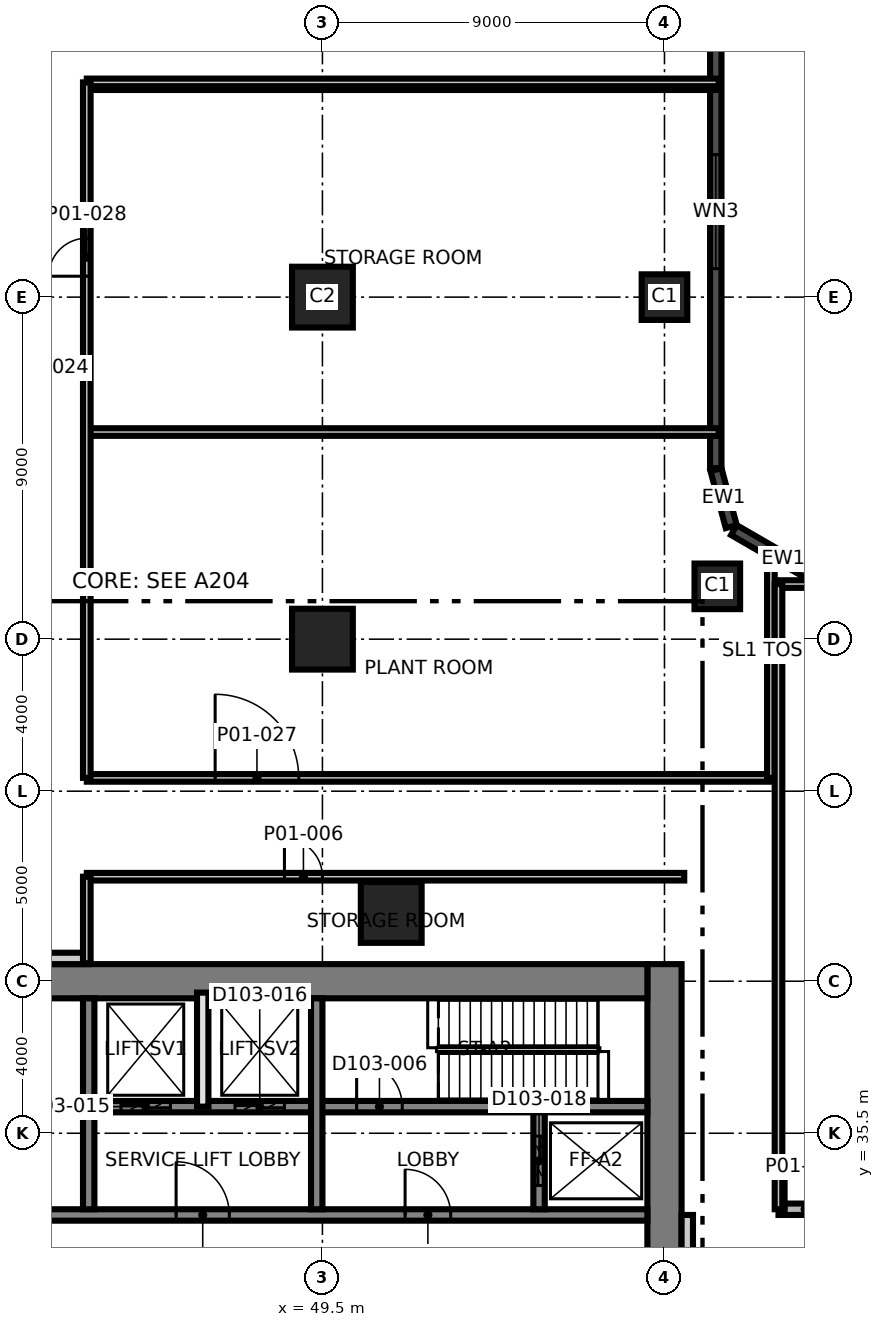
"""IFC4 building model, lengths in metres.
Left out: names, types, materials, properties, quantities, classifications, styles, units other than length and angle.
Written with IfcOpenShell. Run it as: python <this file> out.ifc"""

import sys

from ifc_helpers import new_model, si_unit, direction, frame, frame_2d, origin, origin_2d, place, context, subcontext, project, spatial, rectangle, extrude, element, fill, save


model = new_model("IFC4")
c1 = context("Model", 3, precision=1e-05, world=origin(), true_north=direction((0.0, 1.0)))
c2 = subcontext(c1, "Body", "Model", "MODEL_VIEW")
j1 = project(units=[si_unit("LENGTHUNIT", "METRE"), si_unit("PLANEANGLEUNIT", "RADIAN")], contexts=[c1])
p1 = place(None, origin())
s1 = spatial("IfcSite", under=j1, at=p1, CompositionType="ELEMENT")
p2 = place(p1, origin())
s2 = spatial("IfcBuilding", under=s1, at=p2, CompositionType="ELEMENT")
p3 = place(p2, frame((0.0, 0.0, 8.0)))
s3 = spatial("IfcBuildingStorey", under=s2, at=p3, CompositionType="ELEMENT", Elevation=8.0)
p4 = place(p3, frame((58.5, 21.05, 0.0), z_axis=(0.0, 0.0, 1.0), x_axis=(0.0, 1.0, 0.0)))
e1 = element("IfcWall", 1, at=p4, inside=s3, PredefinedType="SHEAR", context=c2, shape_type="SweptSolid", body=[
    extrude(rectangle(XDim=18.9, YDim=0.9, at=frame_2d((9.45, 0.0))), origin(), (0.0, 0.0, 1.0), 5.5),
])
p5 = place(p3, frame((31.05, 39.5, 0.0), z_axis=(0.0, 0.0, 1.0), x_axis=(1.0, 0.0, 0.0)))
e2 = element("IfcWall", 2, at=p5, inside=s3, PredefinedType="SHEAR", context=c2, shape_type="SweptSolid", body=[
    extrude(rectangle(XDim=27.0, YDim=0.9, at=frame_2d((13.5, 0.0))), origin(), (0.0, 0.0, 1.0), 5.5),
])
p6 = place(p3, frame((31.95, 33.35, 0.0), z_axis=(0.0, 0.0, 1.0), x_axis=(1.0, 0.0, 0.0)))
e3 = element("IfcWall", 3, at=p6, inside=s3, PredefinedType="SHEAR", context=c2, shape_type="SweptSolid", body=[
    extrude(rectangle(XDim=26.1, YDim=0.3, at=frame_2d((13.05, 0.0))), origin(), (0.0, 0.0, 1.0), 5.5),
])
p7 = place(p6, frame((13.7, 0.0, 0.0)))
e4 = element("IfcOpeningElement", 4, at=p7, cuts=e3, PredefinedType="OPENING", context=c2, shape_type="SweptSolid", body=[
    extrude(rectangle(XDim=1.4, YDim=2.1, at=frame_2d((0.7, 1.05))), frame((0.0, 0.16, 0.0), z_axis=(0.0, -1.0, 0.0), x_axis=(1.0, 0.0, 0.0)), (0.0, 0.0, 1.0), 0.32),
])
p8 = place(p6, frame((5.175, 0.0, 0.0)))
e5 = element("IfcOpeningElement", 5, at=p8, cuts=e3, PredefinedType="OPENING", context=c2, shape_type="SweptSolid", body=[
    extrude(rectangle(XDim=1.2, YDim=2.1, at=frame_2d((0.6, 1.05))), frame((0.0, 0.16, 0.0), z_axis=(0.0, -1.0, 0.0), x_axis=(1.0, 0.0, 0.0)), (0.0, 0.0, 1.0), 0.32),
])
p9 = place(p6, frame((19.725, 0.0, 0.0)))
e6 = element("IfcOpeningElement", 6, at=p9, cuts=e3, PredefinedType="OPENING", context=c2, shape_type="SweptSolid", body=[
    extrude(rectangle(XDim=1.2, YDim=2.1, at=frame_2d((0.6, 1.05))), frame((0.0, 0.16, 0.0), z_axis=(0.0, -1.0, 0.0), x_axis=(1.0, 0.0, 0.0)), (0.0, 0.0, 1.0), 0.32),
])
p10 = place(p3, frame((43.5, 36.2, 0.0), z_axis=(0.0, 0.0, 1.0), x_axis=(1.0, 0.0, 0.0)))
e7 = element("IfcWall", 7, at=p10, inside=s3, PredefinedType="SHEAR", context=c2, shape_type="SweptSolid", body=[
    extrude(rectangle(XDim=14.55, YDim=0.3, at=frame_2d((7.275, 0.0))), origin(), (0.0, 0.0, 1.0), 5.5),
])
p11 = place(p10, frame((6.9, 0.0, 0.0)))
e8 = element("IfcOpeningElement", 8, at=p11, cuts=e7, PredefinedType="OPENING", context=c2, shape_type="SweptSolid", body=[
    extrude(rectangle(XDim=1.2, YDim=2.1, at=frame_2d((0.6, 1.05))), frame((0.0, 0.16, 0.0), z_axis=(0.0, -1.0, 0.0), x_axis=(1.0, 0.0, 0.0)), (0.0, 0.0, 1.0), 0.32),
])
p12 = place(p10, frame((0.7, 0.0, 0.0)))
e9 = element("IfcOpeningElement", 9, at=p12, cuts=e7, PredefinedType="OPENING", context=c2, shape_type="SweptSolid", body=[
    extrude(rectangle(XDim=1.3, YDim=2.4, at=frame_2d((0.65, 1.2))), frame((0.0, 0.16, 0.0), z_axis=(0.0, -1.0, 0.0), x_axis=(1.0, 0.0, 0.0)), (0.0, 0.0, 1.0), 0.32),
])
p13 = place(p10, frame((3.7, 0.0, 0.0)))
e10 = element("IfcOpeningElement", 10, at=p13, cuts=e7, PredefinedType="OPENING", context=c2, shape_type="SweptSolid", body=[
    extrude(rectangle(XDim=1.3, YDim=2.4, at=frame_2d((0.65, 1.2))), frame((0.0, 0.16, 0.0), z_axis=(0.0, -1.0, 0.0), x_axis=(1.0, 0.0, 0.0)), (0.0, 0.0, 1.0), 0.32),
])
for number, where, z_axis, x_axis in (
    (11, (43.35, 33.5, 0.0), (0.0, 0.0, 1.0), (0.0, 1.0, 0.0)),
    (12, (49.35, 33.5, 0.0), (0.0, 0.0, 1.0), (0.0, 1.0, 0.0)),
):
    element("IfcWall", number, at=place(p3, frame(where, z_axis=z_axis, x_axis=x_axis)), inside=s3, PredefinedType="SHEAR", context=c2, shape_type="SweptSolid", body=[
        extrude(rectangle(XDim=5.55, YDim=0.3, at=frame_2d((2.775, 0.0))), origin(), (0.0, 0.0, 1.0), 5.5),
    ])
p14 = place(p3, frame((55.2, 33.5, 0.0), z_axis=(0.0, 0.0, 1.0), x_axis=(0.0, 1.0, 0.0)))
e13 = element("IfcWall", 13, at=p14, inside=s3, PredefinedType="SHEAR", context=c2, shape_type="SweptSolid", body=[
    extrude(rectangle(XDim=2.55, YDim=0.3, at=frame_2d((1.275, 0.0))), origin(), (0.0, 0.0, 1.0), 5.5),
])
p15 = place(p14, frame((0.625, 0.0, 0.0)))
e14 = element("IfcOpeningElement", 14, at=p15, cuts=e13, PredefinedType="OPENING", context=c2, shape_type="SweptSolid", body=[
    extrude(rectangle(XDim=1.3, YDim=2.4, at=frame_2d((0.65, 1.2))), frame((0.0, 0.16, 0.0), z_axis=(0.0, -1.0, 0.0), x_axis=(1.0, 0.0, 0.0)), (0.0, 0.0, 1.0), 0.32),
])
p16 = place(p3, frame((49.5, 48.5, 0.0), z_axis=(0.0, 0.0, 1.0), x_axis=(1.0, 0.0, 0.0)))
e15 = element("IfcColumn", 15, at=p16, inside=s3, PredefinedType="COLUMN", context=c2, shape_type="SweptSolid", body=[
    extrude(rectangle(XDim=1.6, YDim=1.6, at=origin_2d()), origin(), (0.0, 0.0, 1.0), 5.5),
])
p17 = place(p3, frame((59.89, 49.89, 0.0), z_axis=(0.0, 0.0, 1.0), x_axis=(1.0, 0.0, 0.0)))
e16 = element("IfcColumn", 16, at=p17, inside=s3, PredefinedType="COLUMN", context=c2, shape_type="SweptSolid", body=[
    extrude(rectangle(XDim=1.2, YDim=1.2, at=origin_2d()), origin(), (0.0, 0.0, 1.0), 5.5),
])
p18 = place(p3, frame((49.5, 57.5, 0.0), z_axis=(0.0, 0.0, 1.0), x_axis=(1.0, 0.0, 0.0)))
e17 = element("IfcColumn", 17, at=p18, inside=s3, PredefinedType="COLUMN", context=c2, shape_type="SweptSolid", body=[
    extrude(rectangle(XDim=1.6, YDim=1.6, at=origin_2d()), origin(), (0.0, 0.0, 1.0), 5.5),
])
p19 = place(p3, frame((58.5, 57.5, 0.0), z_axis=(0.0, 0.0, 1.0), x_axis=(1.0, 0.0, 0.0)))
e18 = element("IfcColumn", 18, at=p19, inside=s3, PredefinedType="COLUMN", context=c2, shape_type="SweptSolid", body=[
    extrude(rectangle(XDim=1.2, YDim=1.2, at=origin_2d()), origin(), (0.0, 0.0, 1.0), 5.5),
])
p20 = place(p3, frame((51.31, 41.31, 0.0), z_axis=(0.0, 0.0, 1.0), x_axis=(1.0, 0.0, 0.0)))
e19 = element("IfcColumn", 19, at=p20, inside=s3, PredefinedType="COLUMN", context=c2, shape_type="SweptSolid", body=[
    extrude(rectangle(XDim=1.6, YDim=1.6, at=origin_2d()), origin(), (0.0, 0.0, 1.0), 5.5),
])
p21 = place(p3, frame((62.925, 49.87, 0.0), z_axis=(0.0, 0.0, 1.0), x_axis=(-0.866031096941, 0.499990139034, 0.0)))
e20 = element("IfcWall", 20, at=p21, inside=s3, PredefinedType="SOLIDWALL", context=c2, shape_type="SweptSolid", body=[
    extrude(rectangle(XDim=3.0, YDim=0.3, at=frame_2d((1.5, 0.0))), origin(), (0.0, 0.0, 1.0), 5.2),
])
p22 = place(p3, frame((60.257, 51.461, 0.0), z_axis=(0.0, 0.0, 1.0), x_axis=(-0.258777996848, 0.965936824201, 0.0)))
e21 = element("IfcWall", 21, at=p22, inside=s3, PredefinedType="SOLIDWALL", context=c2, shape_type="SweptSolid", body=[
    extrude(rectangle(XDim=1.553, YDim=0.3, at=frame_2d((0.776, 0.0))), origin(), (0.0, 0.0, 1.0), 5.2),
])
p23 = place(p3, frame((59.85, 53.0, 0.0), z_axis=(0.0, 0.0, 1.0), x_axis=(0.0, 1.0, 0.0)))
e22 = element("IfcWall", 22, at=p23, inside=s3, PredefinedType="SOLIDWALL", context=c2, shape_type="SweptSolid", body=[
    extrude(rectangle(XDim=26.928, YDim=0.3, at=frame_2d((13.464, 0.0))), origin(), (0.0, 0.0, 1.0), 5.2),
])
p24 = place(p23, frame((5.25, 0.0, 0.9)))
e23 = element("IfcOpeningElement", 23, at=p24, cuts=e22, PredefinedType="OPENING", context=c2, shape_type="SweptSolid", body=[
    extrude(rectangle(XDim=3.0, YDim=2.4, at=frame_2d((1.5, 1.2))), frame((0.0, 0.16, 0.0), z_axis=(0.0, -1.0, 0.0), x_axis=(1.0, 0.0, 0.0)), (0.0, 0.0, 1.0), 0.32),
])
p25 = place(p23, frame((14.25, 0.0, 0.9)))
e24 = element("IfcOpeningElement", 24, at=p25, cuts=e22, PredefinedType="OPENING", context=c2, shape_type="SweptSolid", body=[
    extrude(rectangle(XDim=3.0, YDim=2.4, at=frame_2d((1.5, 1.2))), frame((0.0, 0.16, 0.0), z_axis=(0.0, -1.0, 0.0), x_axis=(1.0, 0.0, 0.0)), (0.0, 0.0, 1.0), 0.32),
])
p26 = place(p23, frame((18.75, 0.0, 0.9)))
e25 = element("IfcOpeningElement", 25, at=p26, cuts=e22, PredefinedType="OPENING", context=c2, shape_type="SweptSolid", body=[
    extrude(rectangle(XDim=3.0, YDim=2.4, at=frame_2d((1.5, 1.2))), frame((0.0, 0.16, 0.0), z_axis=(0.0, -1.0, 0.0), x_axis=(1.0, 0.0, 0.0)), (0.0, 0.0, 1.0), 0.32),
])
p27 = place(p23, frame((23.25, 0.0, 0.9)))
e26 = element("IfcOpeningElement", 26, at=p27, cuts=e22, PredefinedType="OPENING", context=c2, shape_type="SweptSolid", body=[
    extrude(rectangle(XDim=3.0, YDim=2.4, at=frame_2d((1.5, 1.2))), frame((0.0, 0.16, 0.0), z_axis=(0.0, -1.0, 0.0), x_axis=(1.0, 0.0, 0.0)), (0.0, 0.0, 1.0), 0.32),
])
p28 = place(p3, frame((40.65, 40.1, 0.0), z_axis=(0.0, 0.0, 1.0), x_axis=(1.0, 0.0, 0.0)))
e27 = element("IfcWall", 27, at=p28, inside=s3, PredefinedType="PARTITIONING", context=c2, shape_type="SweptSolid", body=[
    extrude(rectangle(XDim=2.7, YDim=0.3, at=frame_2d((1.35, 0.0))), origin(), (0.0, 0.0, 1.0), 5.2),
])
p29 = place(p3, frame((46.35, 36.2, 0.0), z_axis=(0.0, 0.0, 1.0), x_axis=(0.0, 1.0, 0.0)))
e28 = element("IfcWall", 28, at=p29, inside=s3, PredefinedType="SOLIDWALL", context=c2, shape_type="SweptSolid", body=[
    extrude(rectangle(XDim=3.0, YDim=0.3, at=frame_2d((1.5, 0.0))), origin(), (0.0, 0.0, 1.0), 5.2),
])
p30 = place(p3, frame((59.1, 30.65, 0.0), z_axis=(0.0, 0.0, 1.0), x_axis=(0.0, 1.0, 0.0)))
e29 = element("IfcWall", 29, at=p30, inside=s3, PredefinedType="PARTITIONING", context=c2, shape_type="SweptSolid", body=[
    extrude(rectangle(XDim=2.7, YDim=0.3, at=frame_2d((1.35, 0.0))), origin(), (0.0, 0.0, 1.0), 5.2),
])
p31 = place(p3, frame((61.5, 33.5, 0.0), z_axis=(0.0, 0.0, 1.0), x_axis=(1.0, 0.0, 0.0)))
e30 = element("IfcWall", 30, at=p31, inside=s3, PredefinedType="SHEAR", context=c2, shape_type="SweptSolid", body=[
    extrude(rectangle(XDim=43.43, YDim=0.3, at=frame_2d((21.715, 0.0))), origin(), (0.0, 0.0, 1.0), 5.2),
])
p32 = place(p31, frame((31.95, 0.0, 0.0)))
e31 = element("IfcOpeningElement", 31, at=p32, cuts=e30, PredefinedType="OPENING", context=c2, shape_type="SweptSolid", body=[
    extrude(rectangle(XDim=1.8, YDim=2.1, at=frame_2d((0.9, 1.05))), frame((0.0, 0.16, 0.0), z_axis=(0.0, -1.0, 0.0), x_axis=(1.0, 0.0, 0.0)), (0.0, 0.0, 1.0), 0.32),
])
p33 = place(p31, frame((0.2, 0.0, 0.0)))
e32 = element("IfcOpeningElement", 32, at=p33, cuts=e30, PredefinedType="OPENING", context=c2, shape_type="SweptSolid", body=[
    extrude(rectangle(XDim=1.0, YDim=2.1, at=frame_2d((0.5, 1.05))), frame((0.0, 0.16, 0.0), z_axis=(0.0, -1.0, 0.0), x_axis=(1.0, 0.0, 0.0)), (0.0, 0.0, 1.0), 0.32),
])
p34 = place(p31, frame((16.325, 0.0, 0.0)))
e33 = element("IfcOpeningElement", 33, at=p34, cuts=e30, PredefinedType="OPENING", context=c2, shape_type="SweptSolid", body=[
    extrude(rectangle(XDim=1.0, YDim=2.1, at=frame_2d((0.5, 1.05))), frame((0.0, 0.16, 0.0), z_axis=(0.0, -1.0, 0.0), x_axis=(1.0, 0.0, 0.0)), (0.0, 0.0, 1.0), 0.32),
])
p35 = place(p31, frame((25.246, 0.0, 0.0)))
e34 = element("IfcOpeningElement", 34, at=p35, cuts=e30, PredefinedType="OPENING", context=c2, shape_type="SweptSolid", body=[
    extrude(rectangle(XDim=1.0, YDim=2.1, at=frame_2d((0.5, 1.05))), frame((0.0, 0.16, 0.0), z_axis=(0.0, -1.0, 0.0), x_axis=(1.0, 0.0, 0.0)), (0.0, 0.0, 1.0), 0.32),
])
p36 = place(p31, frame((37.945, 0.0, 0.0)))
e35 = element("IfcOpeningElement", 35, at=p36, cuts=e30, PredefinedType="OPENING", context=c2, shape_type="SweptSolid", body=[
    extrude(rectangle(XDim=1.0, YDim=2.1, at=frame_2d((0.5, 1.05))), frame((0.0, 0.16, 0.0), z_axis=(0.0, -1.0, 0.0), x_axis=(1.0, 0.0, 0.0)), (0.0, 0.0, 1.0), 0.32),
])
p37 = place(p3, frame((43.3, 42.25, 0.0), z_axis=(0.0, 0.0, 1.0), x_axis=(1.0, 0.0, 0.0)))
e36 = element("IfcWall", 36, at=p37, inside=s3, PredefinedType="PARTITIONING", context=c2, shape_type="SweptSolid", body=[
    extrude(rectangle(XDim=15.72, YDim=0.2, at=frame_2d((7.86, 0.0))), origin(), (0.0, 0.0, 1.0), 5.2),
])
p38 = place(p37, frame((5.2, 0.0, 0.0)))
e37 = element("IfcOpeningElement", 37, at=p38, cuts=e36, PredefinedType="OPENING", context=c2, shape_type="SweptSolid", body=[
    extrude(rectangle(XDim=1.0, YDim=2.1, at=frame_2d((0.5, 1.05))), frame((0.0, 0.11, 0.0), z_axis=(0.0, -1.0, 0.0), x_axis=(1.0, 0.0, 0.0)), (0.0, 0.0, 1.0), 0.22),
])
p39 = place(p3, frame((43.3, 44.85, 0.0), z_axis=(0.0, 0.0, 1.0), x_axis=(1.0, 0.0, 0.0)))
e38 = element("IfcWall", 38, at=p39, inside=s3, PredefinedType="PARTITIONING", context=c2, shape_type="SweptSolid", body=[
    extrude(rectangle(XDim=18.2, YDim=0.2, at=frame_2d((9.1, 0.0))), origin(), (0.0, 0.0, 1.0), 5.2),
])
p40 = place(p39, frame((3.377, 0.0, 0.0)))
e39 = element("IfcOpeningElement", 39, at=p40, cuts=e38, PredefinedType="OPENING", context=c2, shape_type="SweptSolid", body=[
    extrude(rectangle(XDim=2.2, YDim=2.4, at=frame_2d((1.1, 1.2))), frame((0.0, 0.11, 0.0), z_axis=(0.0, -1.0, 0.0), x_axis=(1.0, 0.0, 0.0)), (0.0, 0.0, 1.0), 0.22),
])
p41 = place(p3, frame((61.5, 49.95, 0.0), z_axis=(0.0, 0.0, 1.0), x_axis=(1.0, 0.0, 0.0)))
e40 = element("IfcWall", 40, at=p41, inside=s3, PredefinedType="PARTITIONING", context=c2, shape_type="SweptSolid", body=[
    extrude(rectangle(XDim=1.416, YDim=0.2, at=frame_2d((0.708, 0.0))), origin(), (0.0, 0.0, 1.0), 5.2),
])
for number, where, z_axis, x_axis in (
    (41, (43.3, 53.95, 0.0), (0.0, 0.0, 1.0), (1.0, 0.0, 0.0)),
    (42, (43.3, 63.05, 0.0), (0.0, 0.0, 1.0), (1.0, 0.0, 0.0)),
    (43, (43.3, 63.15, 0.0), (0.0, 0.0, 1.0), (1.0, 0.0, 0.0)),
):
    element("IfcWall", number, at=place(p3, frame(where, z_axis=z_axis, x_axis=x_axis)), inside=s3, PredefinedType="PARTITIONING", context=c2, shape_type="SweptSolid", body=[
        extrude(rectangle(XDim=16.63, YDim=0.2, at=frame_2d((8.315, 0.0))), origin(), (0.0, 0.0, 1.0), 5.2),
    ])
p42 = place(p3, frame((43.3, 39.97, 0.0), z_axis=(0.0, 0.0, 1.0), x_axis=(0.0, 1.0, 0.0)))
e44 = element("IfcWall", 44, at=p42, inside=s3, PredefinedType="PARTITIONING", context=c2, shape_type="SweptSolid", body=[
    extrude(rectangle(XDim=2.28, YDim=0.2, at=frame_2d((1.14, 0.0))), origin(), (0.0, 0.0, 1.0), 5.2),
])
p43 = place(p3, frame((43.3, 44.85, 0.0), z_axis=(0.0, 0.0, 1.0), x_axis=(0.0, 1.0, 0.0)))
e45 = element("IfcWall", 45, at=p43, inside=s3, PredefinedType="PARTITIONING", context=c2, shape_type="SweptSolid", body=[
    extrude(rectangle(XDim=18.3, YDim=0.2, at=frame_2d((9.15, 0.0))), origin(), (0.0, 0.0, 1.0), 5.2),
])
p44 = place(p43, frame((13.2, 0.0, 0.0)))
e46 = element("IfcOpeningElement", 46, at=p44, cuts=e45, PredefinedType="OPENING", context=c2, shape_type="SweptSolid", body=[
    extrude(rectangle(XDim=1.0, YDim=2.1, at=frame_2d((0.5, 1.05))), frame((0.0, 0.11, 0.0), z_axis=(0.0, -1.0, 0.0), x_axis=(1.0, 0.0, 0.0)), (0.0, 0.0, 1.0), 0.22),
])
p45 = place(p3, frame((61.3, 44.85, 0.0), z_axis=(0.0, 0.0, 1.0), x_axis=(0.0, 1.0, 0.0)))
e47 = element("IfcWall", 47, at=p45, inside=s3, PredefinedType="PARTITIONING", context=c2, shape_type="SweptSolid", body=[
    extrude(rectangle(XDim=5.742, YDim=0.2, at=frame_2d((2.871, 0.0))), origin(), (0.0, 0.0, 1.0), 5.2),
])
p46 = place(p3, frame((61.5, 33.5, 0.0), z_axis=(0.0, 0.0, 1.0), x_axis=(0.0, 1.0, 0.0)))
e48 = element("IfcWall", 48, at=p46, inside=s3, PredefinedType="PARTITIONING", context=c2, shape_type="SweptSolid", body=[
    extrude(rectangle(XDim=16.45, YDim=0.2, at=frame_2d((8.225, 0.0))), origin(), (0.0, 0.0, 1.0), 5.2),
])
p47 = place(p24, origin())
e49 = element("IfcWindow", 49, at=p47, inside=s3, PartitioningType="SINGLE_PANEL", PredefinedType="WINDOW", context=c2, shape_type="SweptSolid", body=[
    extrude(rectangle(XDim=3.0, YDim=2.4, at=frame_2d((1.5, 1.2))), frame((0.0, 0.03, 0.0), z_axis=(0.0, -1.0, 0.0), x_axis=(1.0, 0.0, 0.0)), (0.0, 0.0, 1.0), 0.06),
])
fill(e23, e49)
p48 = place(p7, origin())
e50 = element("IfcDoor", 50, at=p48, inside=s3, OperationType="SINGLE_SWING_RIGHT", PredefinedType="DOOR", context=c2, shape_type="SweptSolid", body=[
    extrude(rectangle(XDim=1.4, YDim=2.1, at=frame_2d((0.7, 1.05))), frame((0.0, 0.025, 0.0), z_axis=(0.0, -1.0, 0.0), x_axis=(1.0, 0.0, 0.0)), (0.0, 0.0, 1.0), 0.05),
])
fill(e4, e50)
p49 = place(p9, origin())
e51 = element("IfcDoor", 51, at=p49, inside=s3, OperationType="SINGLE_SWING_RIGHT", PredefinedType="DOOR", context=c2, shape_type="SweptSolid", body=[
    extrude(rectangle(XDim=1.2, YDim=2.1, at=frame_2d((0.6, 1.05))), frame((0.0, 0.025, 0.0), z_axis=(0.0, -1.0, 0.0), x_axis=(1.0, 0.0, 0.0)), (0.0, 0.0, 1.0), 0.05),
])
fill(e6, e51)
p50 = place(p11, origin())
e52 = element("IfcDoor", 52, at=p50, inside=s3, OperationType="SINGLE_SWING_LEFT", PredefinedType="DOOR", context=c2, shape_type="SweptSolid", body=[
    extrude(rectangle(XDim=1.2, YDim=2.1, at=frame_2d((0.6, 1.05))), frame((0.0, 0.025, 0.0), z_axis=(0.0, -1.0, 0.0), x_axis=(1.0, 0.0, 0.0)), (0.0, 0.0, 1.0), 0.05),
])
fill(e8, e52)
p51 = place(p12, origin())
e53 = element("IfcDoor", 53, at=p51, inside=s3, OperationType="SLIDING_TO_LEFT", PredefinedType="DOOR", context=c2, shape_type="SweptSolid", body=[
    extrude(rectangle(XDim=1.3, YDim=2.4, at=frame_2d((0.65, 1.2))), frame((0.0, 0.025, 0.0), z_axis=(0.0, -1.0, 0.0), x_axis=(1.0, 0.0, 0.0)), (0.0, 0.0, 1.0), 0.05),
])
fill(e9, e53)
p52 = place(p13, origin())
e54 = element("IfcDoor", 54, at=p52, inside=s3, OperationType="SLIDING_TO_LEFT", PredefinedType="DOOR", context=c2, shape_type="SweptSolid", body=[
    extrude(rectangle(XDim=1.3, YDim=2.4, at=frame_2d((0.65, 1.2))), frame((0.0, 0.025, 0.0), z_axis=(0.0, -1.0, 0.0), x_axis=(1.0, 0.0, 0.0)), (0.0, 0.0, 1.0), 0.05),
])
fill(e10, e54)
p53 = place(p15, origin())
e55 = element("IfcDoor", 55, at=p53, inside=s3, OperationType="SLIDING_TO_LEFT", PredefinedType="DOOR", context=c2, shape_type="SweptSolid", body=[
    extrude(rectangle(XDim=1.3, YDim=2.4, at=frame_2d((0.65, 1.2))), frame((0.0, 0.025, 0.0), z_axis=(0.0, -1.0, 0.0), x_axis=(1.0, 0.0, 0.0)), (0.0, 0.0, 1.0), 0.05),
])
fill(e14, e55)
p54 = place(p38, origin())
e56 = element("IfcDoor", 56, at=p54, inside=s3, OperationType="SINGLE_SWING_RIGHT", PredefinedType="DOOR", context=c2, shape_type="SweptSolid", body=[
    extrude(rectangle(XDim=1.0, YDim=2.1, at=frame_2d((0.5, 1.05))), frame((0.0, 0.025, 0.0), z_axis=(0.0, -1.0, 0.0), x_axis=(1.0, 0.0, 0.0)), (0.0, 0.0, 1.0), 0.05),
])
fill(e37, e56)
p55 = place(p33, origin())
e57 = element("IfcDoor", 57, at=p55, inside=s3, OperationType="SINGLE_SWING_LEFT", PredefinedType="DOOR", context=c2, shape_type="SweptSolid", body=[
    extrude(rectangle(XDim=1.0, YDim=2.1, at=frame_2d((0.5, 1.05))), frame((0.0, 0.025, 0.0), z_axis=(0.0, -1.0, 0.0), x_axis=(1.0, 0.0, 0.0)), (0.0, 0.0, 1.0), 0.05),
])
fill(e32, e57)
p56 = place(p40, origin())
e58 = element("IfcDoor", 58, at=p56, inside=s3, OperationType="SINGLE_SWING_LEFT", PredefinedType="DOOR", context=c2, shape_type="SweptSolid", body=[
    extrude(rectangle(XDim=2.2, YDim=2.4, at=frame_2d((1.1, 1.2))), frame((0.0, 0.025, 0.0), z_axis=(0.0, -1.0, 0.0), x_axis=(1.0, 0.0, 0.0)), (0.0, 0.0, 1.0), 0.05),
])
fill(e39, e58)
p57 = place(p44, origin())
e59 = element("IfcDoor", 59, at=p57, inside=s3, OperationType="SINGLE_SWING_RIGHT", PredefinedType="DOOR", context=c2, shape_type="SweptSolid", body=[
    extrude(rectangle(XDim=1.0, YDim=2.1, at=frame_2d((0.5, 1.05))), frame((0.0, 0.025, 0.0), z_axis=(0.0, -1.0, 0.0), x_axis=(1.0, 0.0, 0.0)), (0.0, 0.0, 1.0), 0.05),
])
fill(e46, e59)
save(model, sys.argv[1])
